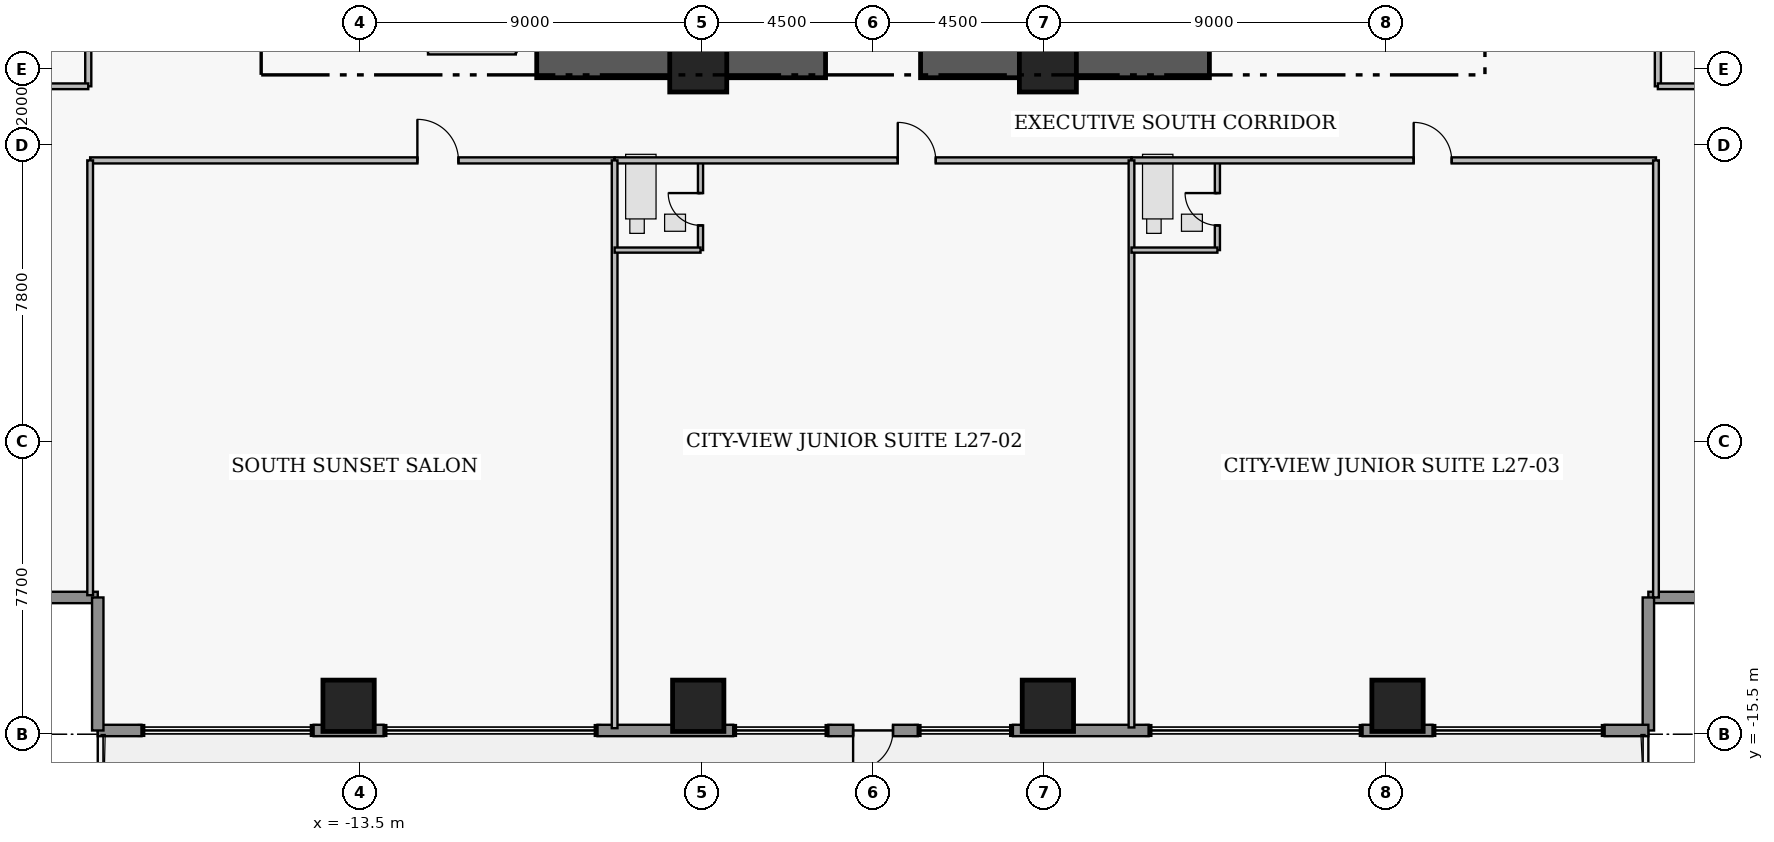
"""IFC4 building model, lengths in metres.
Left out: names, types, materials, properties, quantities, classifications, styles, units other than length and angle.
Written with IfcOpenShell. Run it as: python <this file> out.ifc"""

import sys

from ifc_helpers import new_model, si_unit, direction, frame, frame_2d, origin, origin_2d, place, context, subcontext, project, spatial, rectangle, extrude, element, fill, save


model = new_model("IFC4")
c1 = context("Model", 3, precision=1e-05, world=origin(), true_north=direction((0.0, 1.0)))
c2 = subcontext(c1, "Body", "Model", "MODEL_VIEW")
j1 = project(units=[si_unit("LENGTHUNIT", "METRE"), si_unit("PLANEANGLEUNIT", "RADIAN")], contexts=[c1])
p1 = place(None, origin())
s1 = spatial("IfcSite", under=j1, at=p1, CompositionType="ELEMENT")
p2 = place(p1, origin())
s2 = spatial("IfcBuilding", under=s1, at=p2, CompositionType="ELEMENT")
p3 = place(p2, frame((0.0, 0.0, 110.25)))
s3 = spatial("IfcBuildingStorey", under=s2, at=p3, CompositionType="ELEMENT", Elevation=110.25)
for number, where, z_axis, x_axis in (
    (1, (-8.85, 2.15, 0.0), (0.0, 0.0, 1.0), (1.0, 0.0, 0.0)),
    (2, (1.25, 2.15, 0.0), (0.0, 0.0, 1.0), (1.0, 0.0, 0.0)),
):
    element("IfcWall", number, at=place(p3, frame(where, z_axis=z_axis, x_axis=x_axis)), inside=s3, PredefinedType="SHEAR", context=c2, shape_type="SweptSolid", body=[
        extrude(rectangle(XDim=7.6, YDim=0.75, at=frame_2d((3.8, 0.0))), origin(), (0.0, 0.0, 1.0), 3.43),
    ])
for number, where, z_axis, x_axis in (
    (3, (-4.6, 2.15, 0.0), (0.0, 0.0, 1.0), (1.0, 0.0, 0.0)),
    (4, (4.6, 2.15, 0.0), (0.0, 0.0, 1.0), (1.0, 0.0, 0.0)),
):
    element("IfcColumn", number, at=place(p3, frame(where, z_axis=z_axis, x_axis=x_axis)), inside=s3, PredefinedType="COLUMN", context=c2, shape_type="SweptSolid", body=[
        extrude(rectangle(XDim=1.5, YDim=1.5, at=origin_2d()), origin(), (0.0, 0.0, 1.0), 3.65),
    ])
for number, where, z_axis, x_axis in (
    (5, (-13.8, -14.75, 0.0), (0.0, 0.0, 1.0), (1.0, 0.0, 0.0)),
    (6, (-4.6, -14.75, 0.0), (0.0, 0.0, 1.0), (1.0, 0.0, 0.0)),
    (7, (4.6, -14.75, 0.0), (0.0, 0.0, 1.0), (1.0, 0.0, 0.0)),
    (8, (13.8, -14.75, 0.0), (0.0, 0.0, 1.0), (1.0, 0.0, 0.0)),
):
    element("IfcColumn", number, at=place(p3, frame(where, z_axis=z_axis, x_axis=x_axis)), inside=s3, PredefinedType="COLUMN", context=c2, shape_type="SweptSolid", body=[
        extrude(rectangle(XDim=1.35, YDim=1.35, at=origin_2d()), origin(), (0.0, 0.0, 1.0), 3.65),
    ])
for number, where, z_axis, x_axis in (
    (9, (-20.4, -11.9, 0.0), (0.0, 0.0, 1.0), (-1.0, 0.0, 0.0)),
    (10, (23.9, -11.9, 0.0), (0.0, 0.0, 1.0), (-1.0, 0.0, 0.0)),
    (11, (20.4, -11.9, 0.0), (0.0, 0.0, 1.0), (0.0, -1.0, 0.0)),
):
    element("IfcWall", number, at=place(p3, frame(where, z_axis=z_axis, x_axis=x_axis)), inside=s3, PredefinedType="STANDARD", context=c2, shape_type="SweptSolid", body=[
        extrude(rectangle(XDim=3.5, YDim=0.3, at=frame_2d((1.75, 0.0))), origin(), (0.0, 0.0, 1.0), 3.43),
    ])
p4 = place(p3, frame((20.4, -15.4, 0.0), z_axis=(0.0, 0.0, 1.0), x_axis=(-1.0, 0.0, 0.0)))
e12 = element("IfcWall", 12, at=p4, inside=s3, PredefinedType="STANDARD", context=c2, shape_type="SweptSolid", body=[
    extrude(rectangle(XDim=1.15, YDim=0.3, at=frame_2d((0.575, 0.0))), origin(), (0.0, 0.0, 1.0), 3.43),
])
p5 = place(p3, frame((14.72, -15.4, 0.0), z_axis=(0.0, 0.0, 1.0), x_axis=(-1.0, 0.0, 0.0)))
e13 = element("IfcWall", 13, at=p5, inside=s3, PredefinedType="STANDARD", context=c2, shape_type="SweptSolid", body=[
    extrude(rectangle(XDim=1.84, YDim=0.3, at=frame_2d((0.92, 0.0))), origin(), (0.0, 0.0, 1.0), 3.43),
])
p6 = place(p3, frame((7.25, -15.4, 0.0), z_axis=(0.0, 0.0, 1.0), x_axis=(-1.0, 0.0, 0.0)))
e14 = element("IfcWall", 14, at=p6, inside=s3, PredefinedType="STANDARD", context=c2, shape_type="SweptSolid", body=[
    extrude(rectangle(XDim=3.57, YDim=0.3, at=frame_2d((1.785, 0.0))), origin(), (0.0, 0.0, 1.0), 3.43),
])
p7 = place(p3, frame((1.175, -15.4, 0.0), z_axis=(0.0, 0.0, 1.0), x_axis=(-1.0, 0.0, 0.0)))
e15 = element("IfcWall", 15, at=p7, inside=s3, PredefinedType="STANDARD", context=c2, shape_type="SweptSolid", body=[
    extrude(rectangle(XDim=2.35, YDim=0.3, at=frame_2d((1.175, 0.0))), origin(), (0.0, 0.0, 1.0), 3.43),
])
p8 = place(p7, frame((0.65, 0.0, 0.0)))
e16 = element("IfcOpeningElement", 16, at=p8, cuts=e15, PredefinedType="OPENING", context=c2, shape_type="SweptSolid", body=[
    extrude(rectangle(XDim=1.05, YDim=2.2, at=frame_2d((0.525, 1.1))), frame((0.0, 0.16, 0.0), z_axis=(0.0, -1.0, 0.0), x_axis=(1.0, 0.0, 0.0)), (0.0, 0.0, 1.0), 0.32),
])
p9 = place(p3, frame((-3.68, -15.4, 0.0), z_axis=(0.0, 0.0, 1.0), x_axis=(-1.0, 0.0, 0.0)))
e17 = element("IfcWall", 17, at=p9, inside=s3, PredefinedType="STANDARD", context=c2, shape_type="SweptSolid", body=[
    extrude(rectangle(XDim=3.57, YDim=0.3, at=frame_2d((1.785, 0.0))), origin(), (0.0, 0.0, 1.0), 3.43),
])
p10 = place(p3, frame((-12.88, -15.4, 0.0), z_axis=(0.0, 0.0, 1.0), x_axis=(-1.0, 0.0, 0.0)))
e18 = element("IfcWall", 18, at=p10, inside=s3, PredefinedType="STANDARD", context=c2, shape_type="SweptSolid", body=[
    extrude(rectangle(XDim=1.84, YDim=0.3, at=frame_2d((0.92, 0.0))), origin(), (0.0, 0.0, 1.0), 3.43),
])
p11 = place(p3, frame((-19.25, -15.4, 0.0), z_axis=(0.0, 0.0, 1.0), x_axis=(-1.0, 0.0, 0.0)))
e19 = element("IfcWall", 19, at=p11, inside=s3, PredefinedType="STANDARD", context=c2, shape_type="SweptSolid", body=[
    extrude(rectangle(XDim=1.15, YDim=0.3, at=frame_2d((0.575, 0.0))), origin(), (0.0, 0.0, 1.0), 3.43),
])
p12 = place(p3, frame((-20.4, -15.4, 0.0), z_axis=(0.0, 0.0, 1.0), x_axis=(0.0, 1.0, 0.0)))
e20 = element("IfcWall", 20, at=p12, inside=s3, PredefinedType="STANDARD", context=c2, shape_type="SweptSolid", body=[
    extrude(rectangle(XDim=3.5, YDim=0.3, at=frame_2d((1.75, 0.0))), origin(), (0.0, 0.0, 1.0), 3.43),
])
p13 = place(p3, frame((-20.6, -0.4, 0.0), z_axis=(0.0, 0.0, 1.0), x_axis=(1.0, 0.0, 0.0)))
e21 = element("IfcWall", 21, at=p13, inside=s3, PredefinedType="PARTITIONING", context=c2, shape_type="SweptSolid", body=[
    extrude(rectangle(XDim=13.8, YDim=0.16, at=frame_2d((6.9, 0.0))), origin(), (0.0, 0.0, 1.0), 3.43),
])
p14 = place(p13, frame((8.61, 0.0, 0.0)))
e22 = element("IfcOpeningElement", 22, at=p14, cuts=e21, PredefinedType="OPENING", context=c2, shape_type="SweptSolid", body=[
    extrude(rectangle(XDim=1.08, YDim=2.18, at=frame_2d((0.54, 1.09))), frame((0.0, 0.09, 0.0), z_axis=(0.0, -1.0, 0.0), x_axis=(1.0, 0.0, 0.0)), (0.0, 0.0, 1.0), 0.18),
])
p15 = place(p3, frame((-4.54, -2.76, 0.0), z_axis=(0.0, 0.0, 1.0), x_axis=(0.0, 1.0, 0.0)))
e23 = element("IfcWall", 23, at=p15, inside=s3, PredefinedType="PLUMBINGWALL", context=c2, shape_type="SweptSolid", body=[
    extrude(rectangle(XDim=2.36, YDim=0.135, at=frame_2d((1.18, 0.0))), origin(), (0.0, 0.0, 1.0), 2.747),
])
p16 = place(p15, frame((0.65, 0.0, 0.0)))
e24 = element("IfcOpeningElement", 24, at=p16, cuts=e23, PredefinedType="OPENING", context=c2, shape_type="SweptSolid", body=[
    extrude(rectangle(XDim=0.85, YDim=2.1, at=frame_2d((0.425, 1.05))), frame((0.0, 0.077, 0.0), z_axis=(0.0, -1.0, 0.0), x_axis=(1.0, 0.0, 0.0)), (0.0, 0.0, 1.0), 0.155),
])
p17 = place(p3, frame((-6.8, -0.4, 0.0), z_axis=(0.0, 0.0, 1.0), x_axis=(1.0, 0.0, 0.0)))
e25 = element("IfcWall", 25, at=p17, inside=s3, PredefinedType="PARTITIONING", context=c2, shape_type="SweptSolid", body=[
    extrude(rectangle(XDim=13.6, YDim=0.16, at=frame_2d((6.8, 0.0))), origin(), (0.0, 0.0, 1.0), 3.43),
])
p18 = place(p17, frame((7.45, 0.0, 0.0)))
e26 = element("IfcOpeningElement", 26, at=p18, cuts=e25, PredefinedType="OPENING", context=c2, shape_type="SweptSolid", body=[
    extrude(rectangle(XDim=1.0, YDim=2.15, at=frame_2d((0.5, 1.075))), frame((0.0, 0.09, 0.0), z_axis=(0.0, -1.0, 0.0), x_axis=(1.0, 0.0, 0.0)), (0.0, 0.0, 1.0), 0.18),
])
p19 = place(p3, frame((9.06, -2.76, 0.0), z_axis=(0.0, 0.0, 1.0), x_axis=(0.0, 1.0, 0.0)))
e27 = element("IfcWall", 27, at=p19, inside=s3, PredefinedType="PLUMBINGWALL", context=c2, shape_type="SweptSolid", body=[
    extrude(rectangle(XDim=2.36, YDim=0.135, at=frame_2d((1.18, 0.0))), origin(), (0.0, 0.0, 1.0), 3.43),
])
p20 = place(p19, frame((0.65, 0.0, 0.0)))
e28 = element("IfcOpeningElement", 28, at=p20, cuts=e27, PredefinedType="OPENING", context=c2, shape_type="SweptSolid", body=[
    extrude(rectangle(XDim=0.85, YDim=2.1, at=frame_2d((0.425, 1.05))), frame((0.0, 0.077, 0.0), z_axis=(0.0, -1.0, 0.0), x_axis=(1.0, 0.0, 0.0)), (0.0, 0.0, 1.0), 0.155),
])
p21 = place(p3, frame((6.8, -0.4, 0.0), z_axis=(0.0, 0.0, 1.0), x_axis=(1.0, 0.0, 0.0)))
e29 = element("IfcWall", 29, at=p21, inside=s3, PredefinedType="PARTITIONING", context=c2, shape_type="SweptSolid", body=[
    extrude(rectangle(XDim=13.8, YDim=0.16, at=frame_2d((6.9, 0.0))), origin(), (0.0, 0.0, 1.0), 3.43),
])
p22 = place(p21, frame((7.425, 0.0, 0.0)))
e30 = element("IfcOpeningElement", 30, at=p22, cuts=e29, PredefinedType="OPENING", context=c2, shape_type="SweptSolid", body=[
    extrude(rectangle(XDim=1.0, YDim=2.15, at=frame_2d((0.5, 1.075))), frame((0.0, 0.09, 0.0), z_axis=(0.0, -1.0, 0.0), x_axis=(1.0, 0.0, 0.0)), (0.0, 0.0, 1.0), 0.18),
])
p23 = place(p3, frame((20.65, 1.55, 0.0), z_axis=(0.0, 0.0, 1.0), x_axis=(0.0, 1.0, 0.0)))
e31 = element("IfcWall", 31, at=p23, inside=s3, PredefinedType="PARTITIONING", context=c2, shape_type="SweptSolid", body=[
    extrude(rectangle(XDim=5.2, YDim=0.16, at=frame_2d((2.6, 0.0))), origin(), (0.0, 0.0, 1.0), 3.43),
])
p24 = place(p23, frame((2.14, 0.0, 0.0)))
e32 = element("IfcOpeningElement", 32, at=p24, cuts=e31, PredefinedType="OPENING", context=c2, shape_type="SweptSolid", body=[
    extrude(rectangle(XDim=0.92, YDim=2.12, at=frame_2d((0.46, 1.06))), frame((0.0, 0.09, 0.0), z_axis=(0.0, -1.0, 0.0), x_axis=(1.0, 0.0, 0.0)), (0.0, 0.0, 1.0), 0.18),
])
p25 = place(p3, frame((-20.65, 1.55, 0.0), z_axis=(0.0, 0.0, 1.0), x_axis=(0.0, 1.0, 0.0)))
e33 = element("IfcWall", 33, at=p25, inside=s3, PredefinedType="PARTITIONING", context=c2, shape_type="SweptSolid", body=[
    extrude(rectangle(XDim=5.2, YDim=0.16, at=frame_2d((2.6, 0.0))), origin(), (0.0, 0.0, 1.0), 3.43),
])
p26 = place(p25, frame((2.125, 0.0, 0.0)))
e34 = element("IfcOpeningElement", 34, at=p26, cuts=e33, PredefinedType="OPENING", context=c2, shape_type="SweptSolid", body=[
    extrude(rectangle(XDim=0.95, YDim=2.15, at=frame_2d((0.475, 1.075))), frame((0.0, 0.09, 0.0), z_axis=(0.0, -1.0, 0.0), x_axis=(1.0, 0.0, 0.0)), (0.0, 0.0, 1.0), 0.18),
])
p27 = place(p3, frame((-11.71, 2.47, 0.0), z_axis=(0.0, 0.0, 1.0), x_axis=(1.0, 0.0, 0.0)))
e35 = element("IfcWall", 35, at=p27, inside=s3, PredefinedType="PARTITIONING", context=c2, shape_type="SweptSolid", body=[
    extrude(rectangle(XDim=2.31, YDim=0.165, at=frame_2d((1.155, 0.0))), origin(), (0.0, 0.0, 1.0), 2.03),
])
p28 = place(p3, frame((-20.6, -11.84, 0.0), z_axis=(0.0, 0.0, 1.0), x_axis=(0.0, 1.0, 0.0)))
e36 = element("IfcWall", 36, at=p28, inside=s3, PredefinedType="PARTITIONING", context=c2, shape_type="SweptSolid", body=[
    extrude(rectangle(XDim=11.44, YDim=0.15, at=frame_2d((5.72, 0.0))), origin(), (0.0, 0.0, 1.0), 3.43),
])
p29 = place(p3, frame((-6.8, -15.34, 0.0), z_axis=(0.0, 0.0, 1.0), x_axis=(0.0, 1.0, 0.0)))
e37 = element("IfcWall", 37, at=p29, inside=s3, PredefinedType="PARTITIONING", context=c2, shape_type="SweptSolid", body=[
    extrude(rectangle(XDim=14.94, YDim=0.15, at=frame_2d((7.47, 0.0))), origin(), (0.0, 0.0, 1.0), 3.43),
])
p30 = place(p3, frame((-6.8, -2.76, 0.0), z_axis=(0.0, 0.0, 1.0), x_axis=(1.0, 0.0, 0.0)))
e38 = element("IfcWall", 38, at=p30, inside=s3, PredefinedType="PLUMBINGWALL", context=c2, shape_type="SweptSolid", body=[
    extrude(rectangle(XDim=2.26, YDim=0.135, at=frame_2d((1.13, 0.0))), origin(), (0.0, 0.0, 1.0), 3.43),
])
p31 = place(p3, frame((6.8, -15.32, 0.0), z_axis=(0.0, 0.0, 1.0), x_axis=(0.0, 1.0, 0.0)))
e39 = element("IfcWall", 39, at=p31, inside=s3, PredefinedType="PARTITIONING", context=c2, shape_type="SweptSolid", body=[
    extrude(rectangle(XDim=14.92, YDim=0.15, at=frame_2d((7.46, 0.0))), origin(), (0.0, 0.0, 1.0), 3.43),
])
p32 = place(p3, frame((6.8, -2.76, 0.0), z_axis=(0.0, 0.0, 1.0), x_axis=(1.0, 0.0, 0.0)))
e40 = element("IfcWall", 40, at=p32, inside=s3, PredefinedType="PLUMBINGWALL", context=c2, shape_type="SweptSolid", body=[
    extrude(rectangle(XDim=2.26, YDim=0.135, at=frame_2d((1.13, 0.0))), origin(), (0.0, 0.0, 1.0), 3.43),
])
p33 = place(p3, frame((20.6, -11.9, 0.0), z_axis=(0.0, 0.0, 1.0), x_axis=(0.0, 1.0, 0.0)))
e41 = element("IfcWall", 41, at=p33, inside=s3, PredefinedType="PARTITIONING", context=c2, shape_type="SweptSolid", body=[
    extrude(rectangle(XDim=11.5, YDim=0.15, at=frame_2d((5.75, 0.0))), origin(), (0.0, 0.0, 1.0), 3.43),
])
for number, where, z_axis, x_axis in (
    (42, (20.65, 1.55, 0.0), (0.0, 0.0, 1.0), (1.0, 0.0, 0.0)),
    (43, (-23.867, 1.55, 0.0), (0.0, 0.0, 1.0), (1.0, 0.0, 0.0)),
):
    element("IfcWall", number, at=place(p3, frame(where, z_axis=z_axis, x_axis=x_axis)), inside=s3, PredefinedType="PARTITIONING", context=c2, shape_type="SweptSolid", body=[
        extrude(rectangle(XDim=3.217, YDim=0.15, at=frame_2d((1.608, 0.0))), origin(), (0.0, 0.0, 1.0), 3.43),
    ])
p34 = place(p8, origin())
e44 = element("IfcDoor", 44, at=p34, inside=s3, OperationType="SINGLE_SWING_RIGHT", PredefinedType="DOOR", context=c2, shape_type="SweptSolid", body=[
    extrude(rectangle(XDim=1.05, YDim=2.2, at=frame_2d((0.525, 1.1))), frame((0.0, 0.025, 0.0), z_axis=(0.0, -1.0, 0.0), x_axis=(1.0, 0.0, 0.0)), (0.0, 0.0, 1.0), 0.05),
])
fill(e16, e44)
p35 = place(p14, origin())
e45 = element("IfcDoor", 45, at=p35, inside=s3, OperationType="SINGLE_SWING_LEFT", PredefinedType="DOOR", context=c2, shape_type="SweptSolid", body=[
    extrude(rectangle(XDim=1.08, YDim=2.18, at=frame_2d((0.54, 1.09))), frame((0.0, 0.025, 0.0), z_axis=(0.0, -1.0, 0.0), x_axis=(1.0, 0.0, 0.0)), (0.0, 0.0, 1.0), 0.05),
])
fill(e22, e45)
p36 = place(p16, origin())
e46 = element("IfcDoor", 46, at=p36, inside=s3, OperationType="SINGLE_SWING_RIGHT", PredefinedType="DOOR", context=c2, shape_type="SweptSolid", body=[
    extrude(rectangle(XDim=0.85, YDim=2.1, at=frame_2d((0.425, 1.05))), frame((0.0, 0.025, 0.0), z_axis=(0.0, -1.0, 0.0), x_axis=(1.0, 0.0, 0.0)), (0.0, 0.0, 1.0), 0.05),
])
fill(e24, e46)
p37 = place(p18, origin())
e47 = element("IfcDoor", 47, at=p37, inside=s3, OperationType="SINGLE_SWING_LEFT", PredefinedType="DOOR", context=c2, shape_type="SweptSolid", body=[
    extrude(rectangle(XDim=1.0, YDim=2.15, at=frame_2d((0.5, 1.075))), frame((0.0, 0.025, 0.0), z_axis=(0.0, -1.0, 0.0), x_axis=(1.0, 0.0, 0.0)), (0.0, 0.0, 1.0), 0.05),
])
fill(e26, e47)
p38 = place(p20, origin())
e48 = element("IfcDoor", 48, at=p38, inside=s3, OperationType="SINGLE_SWING_RIGHT", PredefinedType="DOOR", context=c2, shape_type="SweptSolid", body=[
    extrude(rectangle(XDim=0.85, YDim=2.1, at=frame_2d((0.425, 1.05))), frame((0.0, 0.025, 0.0), z_axis=(0.0, -1.0, 0.0), x_axis=(1.0, 0.0, 0.0)), (0.0, 0.0, 1.0), 0.05),
])
fill(e28, e48)
p39 = place(p22, origin())
e49 = element("IfcDoor", 49, at=p39, inside=s3, OperationType="SINGLE_SWING_LEFT", PredefinedType="DOOR", context=c2, shape_type="SweptSolid", body=[
    extrude(rectangle(XDim=1.0, YDim=2.15, at=frame_2d((0.5, 1.075))), frame((0.0, 0.025, 0.0), z_axis=(0.0, -1.0, 0.0), x_axis=(1.0, 0.0, 0.0)), (0.0, 0.0, 1.0), 0.05),
])
fill(e30, e49)
save(model, sys.argv[1])
